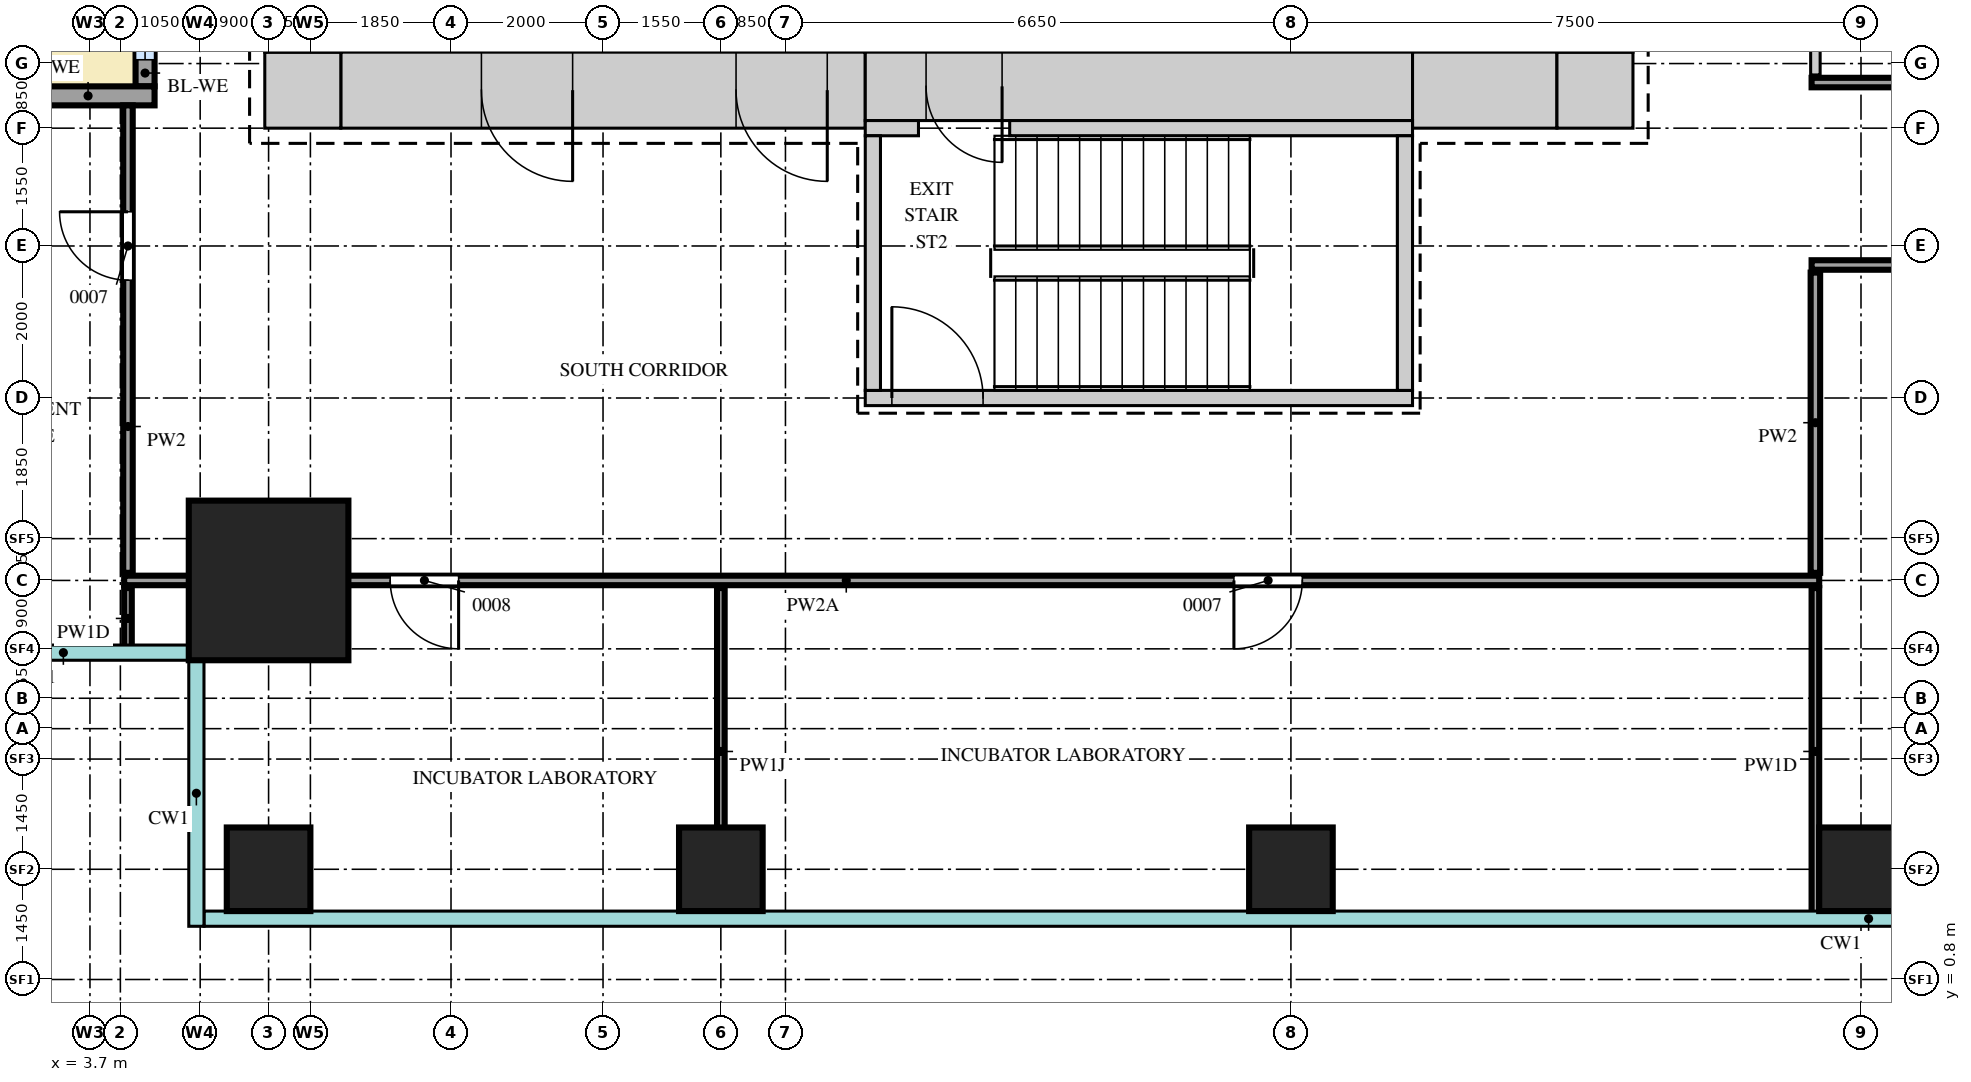
"""IFC4 building model, lengths in metres.
Left out: names, types, materials, properties, quantities, classifications, styles, units other than length and angle.
Written with IfcOpenShell. Run it as: python <this file> out.ifc"""

import sys

from ifc_helpers import new_model, si_unit, direction, frame, frame_2d, origin, origin_2d, place, context, subcontext, project, spatial, rectangle, extrude, source, transform, mapped, element, fill, save


model = new_model("IFC4")
c1 = context("Model", 3, precision=1e-05, world=origin(), true_north=direction((0.0, 1.0)))
c2 = subcontext(c1, "Body", "Model", "MODEL_VIEW")
j1 = project(units=[si_unit("LENGTHUNIT", "METRE"), si_unit("PLANEANGLEUNIT", "RADIAN")], contexts=[c1])
p1 = place(None, origin())
s1 = spatial("IfcSite", under=j1, at=p1, CompositionType="ELEMENT")
p2 = place(p1, origin())
s2 = spatial("IfcBuilding", under=s1, at=p2, CompositionType="ELEMENT")
p3 = place(p2, frame((0.0, 0.0, 149.9)))
s3 = spatial("IfcBuildingStorey", under=s2, at=p3, CompositionType="ELEMENT", Elevation=149.9)
m1 = source(origin(), c2, "Body", "SweptSolid", [
    extrude(rectangle(XDim=6.9, YDim=1.0, at=frame_2d((3.45, 0.0))), origin(), (0.0, 0.0, 1.0), 4.1),
])
p4 = place(p3, frame((7.0, 12.5, 0.0), z_axis=(0.0, 0.0, 1.0), x_axis=(1.0, 0.0, 0.0)))
e1 = element("IfcWall", 1, at=p4, inside=s3, PredefinedType="SHEAR", context=c2, shape_type="MappedRepresentation", body=[
    mapped(m1, transform((0.0, 0.0, 0.0))),
])
m2 = source(origin(), c2, "Body", "SweptSolid", [
    extrude(rectangle(XDim=1.2, YDim=2.1, at=frame_2d((0.6, 1.05))), frame((0.0, 0.51, 0.0), z_axis=(0.0, -1.0, 0.0), x_axis=(1.0, 0.0, 0.0)), (0.0, 0.0, 1.0), 1.02),
])
p5 = place(p4, frame((5.2, 0.0, 0.0)))
e2 = element("IfcOpeningElement", 2, at=p5, cuts=e1, PredefinedType="OPENING", context=c2, shape_type="MappedRepresentation", body=[
    mapped(m2, transform((0.0, 0.0, 0.0))),
])
p6 = place(p4, frame((1.85, 0.0, 0.0)))
e3 = element("IfcOpeningElement", 3, at=p6, cuts=e1, PredefinedType="OPENING", context=c2, shape_type="MappedRepresentation", body=[
    mapped(m2, transform((0.0, 0.0, 0.0))),
])
m3 = source(origin(), c2, "Body", "SweptSolid", [
    extrude(rectangle(XDim=7.2, YDim=0.9, at=frame_2d((3.6, 0.0))), origin(), (0.0, 0.0, 1.0), 4.1),
])
p7 = place(p3, frame((13.9, 12.55, 0.0), z_axis=(0.0, 0.0, 1.0), x_axis=(1.0, 0.0, 0.0)))
e4 = element("IfcWall", 4, at=p7, inside=s3, PredefinedType="SHEAR", context=c2, shape_type="MappedRepresentation", body=[
    mapped(m3, transform((0.0, 0.0, 0.0))),
])
m4 = source(origin(), c2, "Body", "SweptSolid", [
    extrude(rectangle(XDim=1.0, YDim=2.1, at=frame_2d((0.5, 1.05))), frame((0.0, 0.46, 0.0), z_axis=(0.0, -1.0, 0.0), x_axis=(1.0, 0.0, 0.0)), (0.0, 0.0, 1.0), 0.92),
])
p8 = place(p7, frame((0.8, 0.0, 0.0)))
e5 = element("IfcOpeningElement", 5, at=p8, cuts=e4, PredefinedType="OPENING", context=c2, shape_type="MappedRepresentation", body=[
    mapped(m4, transform((0.0, 0.0, 0.0))),
])
m5 = source(origin(), c2, "Body", "SweptSolid", [
    extrude(rectangle(XDim=1.9, YDim=1.0, at=frame_2d((0.95, 0.0))), origin(), (0.0, 0.0, 1.0), 4.1),
])
p9 = place(p3, frame((21.1, 12.5, 0.0), z_axis=(0.0, 0.0, 1.0), x_axis=(1.0, 0.0, 0.0)))
e6 = element("IfcWall", 6, at=p9, inside=s3, PredefinedType="SHEAR", context=c2, shape_type="MappedRepresentation", body=[
    mapped(m5, transform((0.0, 0.0, 0.0))),
])
m6 = source(origin(), c2, "Body", "SweptSolid", [
    extrude(rectangle(XDim=1.0, YDim=1.0, at=frame_2d((0.5, 0.0))), origin(), (0.0, 0.0, 1.0), 4.1),
])
for number, where, z_axis, x_axis in (
    (7, (23.0, 12.5, 0.0), (0.0, 0.0, 1.0), (1.0, 0.0, 0.0)),
    (8, (6.0, 12.5, 0.0), (0.0, 0.0, 1.0), (1.0, 0.0, 0.0)),
):
    element("IfcWall", number, at=place(p3, frame(where, z_axis=z_axis, x_axis=x_axis)), inside=s3, PredefinedType="SHEAR", context=c2, shape_type="MappedRepresentation", body=[
        mapped(m6, transform((0.0, 0.0, 0.0))),
    ])
m7 = source(origin(), c2, "Body", "SweptSolid", [
    extrude(rectangle(XDim=0.7, YDim=0.2, at=frame_2d((0.35, 0.0))), origin(), (0.0, 0.0, 1.0), 4.1),
])
p10 = place(p3, frame((13.9, 12.0, 0.0), z_axis=(0.0, 0.0, 1.0), x_axis=(1.0, 0.0, 0.0)))
e9 = element("IfcWall", 9, at=p10, inside=s3, PredefinedType="SHEAR", context=c2, shape_type="MappedRepresentation", body=[
    mapped(m7, transform((0.0, 0.0, 0.0))),
])
m8 = source(origin(), c2, "Body", "SweptSolid", [
    extrude(rectangle(XDim=5.3, YDim=0.2, at=frame_2d((2.65, 0.0))), origin(), (0.0, 0.0, 1.0), 4.1),
])
p11 = place(p3, frame((15.8, 12.0, 0.0), z_axis=(0.0, 0.0, 1.0), x_axis=(1.0, 0.0, 0.0)))
e10 = element("IfcWall", 10, at=p11, inside=s3, PredefinedType="SHEAR", context=c2, shape_type="MappedRepresentation", body=[
    mapped(m8, transform((0.0, 0.0, 0.0))),
])
m9 = source(origin(), c2, "Body", "SweptSolid", [
    extrude(rectangle(XDim=7.2, YDim=0.2, at=frame_2d((3.6, 0.0))), origin(), (0.0, 0.0, 1.0), 4.1),
])
p12 = place(p3, frame((13.9, 8.45, 0.0), z_axis=(0.0, 0.0, 1.0), x_axis=(1.0, 0.0, 0.0)))
e11 = element("IfcWall", 11, at=p12, inside=s3, PredefinedType="SHEAR", context=c2, shape_type="MappedRepresentation", body=[
    mapped(m9, transform((0.0, 0.0, 0.0))),
])
m10 = source(origin(), c2, "Body", "SweptSolid", [
    extrude(rectangle(XDim=1.2, YDim=2.1, at=frame_2d((0.6, 1.05))), frame((0.0, 0.11, 0.0), z_axis=(0.0, -1.0, 0.0), x_axis=(1.0, 0.0, 0.0)), (0.0, 0.0, 1.0), 0.22),
])
p13 = place(p12, frame((0.35, 0.0, 0.0)))
e12 = element("IfcOpeningElement", 12, at=p13, cuts=e11, PredefinedType="OPENING", context=c2, shape_type="MappedRepresentation", body=[
    mapped(m10, transform((0.0, 0.0, 0.0))),
])
m11 = source(origin(), c2, "Body", "SweptSolid", [
    extrude(rectangle(XDim=3.35, YDim=0.2, at=frame_2d((1.675, 0.0))), origin(), (0.0, 0.0, 1.0), 4.1),
])
for number, where, z_axis, x_axis in (
    (13, (21.0, 8.55, 0.0), (0.0, 0.0, 1.0), (0.0, 1.0, 0.0)),
    (14, (14.0, 8.55, 0.0), (0.0, 0.0, 1.0), (0.0, 1.0, 0.0)),
):
    element("IfcWall", number, at=place(p3, frame(where, z_axis=z_axis, x_axis=x_axis)), inside=s3, PredefinedType="SHEAR", context=c2, shape_type="MappedRepresentation", body=[
        mapped(m11, transform((0.0, 0.0, 0.0))),
    ])
m12 = source(origin(), c2, "Body", "SweptSolid", [
    extrude(rectangle(XDim=2.1, YDim=2.1, at=origin_2d()), origin(), (0.0, 0.0, 1.0), 4.4),
])
p14 = place(p3, frame((6.05, 6.05, 0.0), z_axis=(0.0, 0.0, 1.0), x_axis=(1.0, 0.0, 0.0)))
e15 = element("IfcColumn", 15, at=p14, inside=s3, PredefinedType="COLUMN", context=c2, shape_type="MappedRepresentation", body=[
    mapped(m12, transform((0.0, 0.0, 0.0))),
])
m13 = source(origin(), c2, "Body", "SweptSolid", [
    extrude(rectangle(XDim=1.1, YDim=1.1, at=origin_2d()), origin(), (0.0, 0.0, 1.0), 4.1),
])
for number, where, z_axis, x_axis in (
    (16, (6.05, 2.25, 0.0), (0.0, 0.0, 1.0), (1.0, 0.0, 0.0)),
    (17, (12.0, 2.25, 0.0), (0.0, 0.0, 1.0), (1.0, 0.0, 0.0)),
    (18, (19.5, 2.25, 0.0), (0.0, 0.0, 1.0), (1.0, 0.0, 0.0)),
    (19, (27.0, 2.25, 0.0), (0.0, 0.0, 1.0), (1.0, 0.0, 0.0)),
):
    element("IfcColumn", number, at=place(p3, frame(where, z_axis=z_axis, x_axis=x_axis)), inside=s3, PredefinedType="COLUMN", context=c2, shape_type="MappedRepresentation", body=[
        mapped(m13, transform((0.0, 0.0, 0.0))),
    ])
m14 = source(origin(), c2, "Body", "SweptSolid", [
    extrude(rectangle(XDim=6.4, YDim=0.25, at=frame_2d((3.2, 0.0))), origin(), (0.0, 0.0, 1.0), 3.5),
])
p15 = place(p3, frame((4.425, 12.55, 0.0), z_axis=(0.0, 0.0, 1.0), x_axis=(0.0, 1.0, 0.0)))
e20 = element("IfcWall", 20, at=p15, inside=s3, PredefinedType="SOLIDWALL", context=c2, shape_type="MappedRepresentation", body=[
    mapped(m14, transform((0.0, 0.0, 0.0))),
])
m15 = source(origin(), c2, "Body", "SweptSolid", [
    extrude(rectangle(XDim=1.65, YDim=2.4, at=frame_2d((0.825, 1.2))), frame((0.0, 0.135, 0.0), z_axis=(0.0, -1.0, 0.0), x_axis=(1.0, 0.0, 0.0)), (0.0, 0.0, 1.0), 0.27),
])
p16 = place(p15, frame((0.35, 0.0, 0.0)))
e21 = element("IfcOpeningElement", 21, at=p16, cuts=e20, PredefinedType="OPENING", context=c2, shape_type="MappedRepresentation", body=[
    mapped(m15, transform((0.0, 0.0, 0.0))),
])
p17 = place(p15, frame((4.4, 0.0, 0.0)))
e22 = element("IfcOpeningElement", 22, at=p17, cuts=e20, PredefinedType="OPENING", context=c2, shape_type="MappedRepresentation", body=[
    mapped(m15, transform((0.0, 0.0, 0.0))),
])
m16 = source(origin(), c2, "Body", "SweptSolid", [
    extrude(rectangle(XDim=1.8, YDim=2.4, at=frame_2d((0.9, 1.2))), frame((0.0, 0.135, 0.0), z_axis=(0.0, -1.0, 0.0), x_axis=(1.0, 0.0, 0.0)), (0.0, 0.0, 1.0), 0.27),
])
p18 = place(p15, frame((2.3, 0.0, 0.0)))
e23 = element("IfcOpeningElement", 23, at=p18, cuts=e20, PredefinedType="OPENING", context=c2, shape_type="MappedRepresentation", body=[
    mapped(m16, transform((0.0, 0.0, 0.0))),
])
m17 = source(origin(), c2, "Body", "SweptSolid", [
    extrude(rectangle(XDim=1.75, YDim=0.25, at=frame_2d((0.875, 0.0))), origin(), (0.0, 0.0, 1.0), 3.5),
])
p19 = place(p3, frame((2.8, 12.425, 0.0), z_axis=(0.0, 0.0, 1.0), x_axis=(1.0, 0.0, 0.0)))
e24 = element("IfcWall", 24, at=p19, inside=s3, PredefinedType="SOLIDWALL", context=c2, shape_type="MappedRepresentation", body=[
    mapped(m17, transform((0.0, 0.0, 0.0))),
])
m18 = source(origin(), c2, "Body", "SweptSolid", [
    extrude(rectangle(XDim=4.3, YDim=0.1, at=frame_2d((2.15, 0.0))), origin(), (0.0, 0.0, 1.0), 3.65),
])
p20 = place(p3, frame((12.0, 1.65, 0.0), z_axis=(0.0, 0.0, 1.0), x_axis=(0.0, 1.0, 0.0)))
e25 = element("IfcWall", 25, at=p20, inside=s3, PredefinedType="PARTITIONING", context=c2, shape_type="MappedRepresentation", body=[
    mapped(m18, transform((0.0, 0.0, 0.0))),
])
m19 = source(origin(), c2, "Body", "SweptSolid", [
    extrude(rectangle(XDim=4.3, YDim=0.1, at=frame_2d((2.15, 0.0))), origin(), (0.0, 0.0, 1.0), 4.2),
])
p21 = place(p3, frame((26.4, 1.65, 0.0), z_axis=(0.0, 0.0, 1.0), x_axis=(0.0, 1.0, 0.0)))
e26 = element("IfcWall", 26, at=p21, inside=s3, PredefinedType="PARTITIONING", context=c2, shape_type="MappedRepresentation", body=[
    mapped(m19, transform((0.0, 0.0, 0.0))),
])
m20 = source(origin(), c2, "Body", "SweptSolid", [
    extrude(rectangle(XDim=0.8, YDim=0.1, at=frame_2d((0.4, 0.0))), origin(), (0.0, 0.0, 1.0), 4.2),
])
p22 = place(p3, frame((4.2, 5.15, 0.0), z_axis=(0.0, 0.0, 1.0), x_axis=(0.0, 1.0, 0.0)))
e27 = element("IfcWall", 27, at=p22, inside=s3, PredefinedType="PARTITIONING", context=c2, shape_type="MappedRepresentation", body=[
    mapped(m20, transform((0.0, 0.0, 0.0))),
])
m21 = source(origin(), c2, "Body", "SweptSolid", [
    extrude(rectangle(XDim=22.3, YDim=0.125, at=frame_2d((11.15, 0.0))), origin(), (0.0, 0.0, 1.0), 3.55),
])
p23 = place(p3, frame((4.15, 6.05, 0.0), z_axis=(0.0, 0.0, 1.0), x_axis=(1.0, 0.0, 0.0)))
e28 = element("IfcWall", 28, at=p23, inside=s3, PredefinedType="PARTITIONING", context=c2, shape_type="MappedRepresentation", body=[
    mapped(m21, transform((0.0, 0.0, 0.0))),
])
m22 = source(origin(), c2, "Body", "SweptSolid", [
    extrude(rectangle(XDim=0.9, YDim=2.1, at=frame_2d((0.45, 1.05))), frame((0.0, 0.073, 0.0), z_axis=(0.0, -1.0, 0.0), x_axis=(1.0, 0.0, 0.0)), (0.0, 0.0, 1.0), 0.145),
])
p24 = place(p23, frame((3.5, 0.0, 0.0)))
e29 = element("IfcOpeningElement", 29, at=p24, cuts=e28, PredefinedType="OPENING", context=c2, shape_type="MappedRepresentation", body=[
    mapped(m22, transform((0.0, 0.0, 0.0))),
])
p25 = place(p23, frame((14.6, 0.0, 0.0)))
e30 = element("IfcOpeningElement", 30, at=p25, cuts=e28, PredefinedType="OPENING", context=c2, shape_type="MappedRepresentation", body=[
    mapped(m22, transform((0.0, 0.0, 0.0))),
])
m23 = source(origin(), c2, "Body", "SweptSolid", [
    extrude(rectangle(XDim=6.15, YDim=0.125, at=frame_2d((3.075, 0.0))), origin(), (0.0, 0.0, 1.0), 4.2),
])
p26 = place(p3, frame((4.2, 6.15, 0.0), z_axis=(0.0, 0.0, 1.0), x_axis=(0.0, 1.0, 0.0)))
e31 = element("IfcWall", 31, at=p26, inside=s3, PredefinedType="PARTITIONING", context=c2, shape_type="MappedRepresentation", body=[
    mapped(m23, transform((0.0, 0.0, 0.0))),
])
p27 = place(p26, frame((3.85, 0.0, 0.0)))
e32 = element("IfcOpeningElement", 32, at=p27, cuts=e31, PredefinedType="OPENING", context=c2, shape_type="MappedRepresentation", body=[
    mapped(m22, transform((0.0, 0.0, 0.0))),
])
m24 = source(origin(), c2, "Body", "SweptSolid", [
    extrude(rectangle(XDim=3.95, YDim=0.125, at=frame_2d((1.975, 0.0))), origin(), (0.0, 0.0, 1.0), 4.2),
])
p28 = place(p3, frame((26.4, 6.15, 0.0), z_axis=(0.0, 0.0, 1.0), x_axis=(0.0, 1.0, 0.0)))
e33 = element("IfcWall", 33, at=p28, inside=s3, PredefinedType="PARTITIONING", context=c2, shape_type="MappedRepresentation", body=[
    mapped(m24, transform((0.0, 0.0, 0.0))),
])
m25 = source(origin(), c2, "Body", "SweptSolid", [
    extrude(rectangle(XDim=20.0, YDim=0.125, at=frame_2d((10.0, 0.0))), origin(), (0.0, 0.0, 1.0), 4.2),
])
p29 = place(p3, frame((26.35, 10.2, 0.0), z_axis=(0.0, 0.0, 1.0), x_axis=(1.0, 0.0, 0.0)))
e34 = element("IfcWall", 34, at=p29, inside=s3, PredefinedType="PARTITIONING", context=c2, shape_type="MappedRepresentation", body=[
    mapped(m25, transform((0.0, 0.0, 0.0))),
])
m26 = source(origin(), c2, "Body", "SweptSolid", [
    extrude(rectangle(XDim=1.2, YDim=2.1, at=frame_2d((0.6, 1.05))), frame((0.0, 0.073, 0.0), z_axis=(0.0, -1.0, 0.0), x_axis=(1.0, 0.0, 0.0)), (0.0, 0.0, 1.0), 0.145),
])
p30 = place(p29, frame((8.25, 0.0, 0.0)))
e35 = element("IfcOpeningElement", 35, at=p30, cuts=e34, PredefinedType="OPENING", context=c2, shape_type="MappedRepresentation", body=[
    mapped(m26, transform((0.0, 0.0, 0.0))),
])
m27 = source(origin(), c2, "Body", "SweptSolid", [
    extrude(rectangle(XDim=17.7, YDim=0.125, at=frame_2d((8.85, 0.0))), origin(), (0.0, 0.0, 1.0), 4.2),
])
p31 = place(p3, frame((26.35, 12.6, 0.0), z_axis=(0.0, 0.0, 1.0), x_axis=(1.0, 0.0, 0.0)))
e36 = element("IfcWall", 36, at=p31, inside=s3, PredefinedType="PARTITIONING", context=c2, shape_type="MappedRepresentation", body=[
    mapped(m27, transform((0.0, 0.0, 0.0))),
])
m28 = source(origin(), c2, "Body", "SweptSolid", [
    extrude(rectangle(XDim=23.2, YDim=0.125, at=frame_2d((11.6, 0.0))), origin(), (0.0, 0.0, 1.0), 4.2),
])
p32 = place(p3, frame((26.4, 12.7, 0.0), z_axis=(0.0, 0.0, 1.0), x_axis=(0.0, 1.0, 0.0)))
e37 = element("IfcWall", 37, at=p32, inside=s3, PredefinedType="PARTITIONING", context=c2, shape_type="MappedRepresentation", body=[
    mapped(m28, transform((0.0, 0.0, 0.0))),
])
p33 = place(p32, frame((6.65, 0.0, 0.0)))
e38 = element("IfcOpeningElement", 38, at=p33, cuts=e37, PredefinedType="OPENING", context=c2, shape_type="MappedRepresentation", body=[
    mapped(m26, transform((0.0, 0.0, 0.0))),
])
m29 = source(origin(), c2, "Body", "SweptSolid", [
    extrude(rectangle(XDim=1.65, YDim=2.4, at=frame_2d((0.825, 1.2))), frame((0.0, 0.03, 0.0), z_axis=(0.0, -1.0, 0.0), x_axis=(1.0, 0.0, 0.0)), (0.0, 0.0, 1.0), 0.06),
])
p34 = place(p16, origin())
e39 = element("IfcWindow", 39, at=p34, inside=s3, PartitioningType="SINGLE_PANEL", PredefinedType="WINDOW", context=c2, shape_type="MappedRepresentation", body=[
    mapped(m29, transform((0.0, 0.0, 0.0))),
])
fill(e21, e39)
m30 = source(origin(), c2, "Body", "SweptSolid", [
    extrude(rectangle(XDim=1.2, YDim=2.1, at=frame_2d((0.6, 1.05))), frame((0.0, 0.45, 0.0), z_axis=(0.0, -1.0, 0.0), x_axis=(1.0, 0.0, 0.0)), (0.0, 0.0, 1.0), 0.9),
])
p35 = place(p5, origin())
e40 = element("IfcDoor", 40, at=p35, inside=s3, OperationType="SINGLE_SWING_RIGHT", PredefinedType="DOOR", context=c2, shape_type="MappedRepresentation", body=[
    mapped(m30, transform((0.0, 0.0, 0.0))),
])
fill(e2, e40)
p36 = place(p6, origin())
e41 = element("IfcDoor", 41, at=p36, inside=s3, OperationType="SINGLE_SWING_RIGHT", PredefinedType="DOOR", context=c2, shape_type="MappedRepresentation", body=[
    mapped(m30, transform((0.0, 0.0, 0.0))),
])
fill(e3, e41)
m31 = source(origin(), c2, "Body", "SweptSolid", [
    extrude(rectangle(XDim=1.0, YDim=2.1, at=frame_2d((0.5, 1.05))), frame((0.0, 0.4, 0.0), z_axis=(0.0, -1.0, 0.0), x_axis=(1.0, 0.0, 0.0)), (0.0, 0.0, 1.0), 0.8),
])
p37 = place(p8, origin())
e42 = element("IfcDoor", 42, at=p37, inside=s3, OperationType="SINGLE_SWING_RIGHT", PredefinedType="DOOR", context=c2, shape_type="MappedRepresentation", body=[
    mapped(m31, transform((0.0, 0.0, 0.0))),
])
fill(e5, e42)
m32 = source(origin(), c2, "Body", "SweptSolid", [
    extrude(rectangle(XDim=0.9, YDim=2.1, at=frame_2d((0.45, 1.05))), frame((0.0, 0.025, 0.0), z_axis=(0.0, -1.0, 0.0), x_axis=(1.0, 0.0, 0.0)), (0.0, 0.0, 1.0), 0.05),
])
p38 = place(p24, origin())
e43 = element("IfcDoor", 43, at=p38, inside=s3, OperationType="SINGLE_SWING_RIGHT", PredefinedType="DOOR", context=c2, shape_type="MappedRepresentation", body=[
    mapped(m32, transform((0.0, 0.0, 0.0))),
])
fill(e29, e43)
p39 = place(p25, origin())
e44 = element("IfcDoor", 44, at=p39, inside=s3, OperationType="SINGLE_SWING_LEFT", PredefinedType="DOOR", context=c2, shape_type="MappedRepresentation", body=[
    mapped(m32, transform((0.0, 0.0, 0.0))),
])
fill(e30, e44)
p40 = place(p27, origin())
e45 = element("IfcDoor", 45, at=p40, inside=s3, OperationType="SINGLE_SWING_LEFT", PredefinedType="DOOR", context=c2, shape_type="MappedRepresentation", body=[
    mapped(m32, transform((0.0, 0.0, 0.0))),
])
fill(e32, e45)
m33 = source(origin(), c2, "Body", "SweptSolid", [
    extrude(rectangle(XDim=1.2, YDim=2.1, at=frame_2d((0.6, 1.05))), frame((0.0, 0.025, 0.0), z_axis=(0.0, -1.0, 0.0), x_axis=(1.0, 0.0, 0.0)), (0.0, 0.0, 1.0), 0.05),
])
p41 = place(p13, origin())
e46 = element("IfcDoor", 46, at=p41, inside=s3, OperationType="SINGLE_SWING_RIGHT", PredefinedType="DOOR", context=c2, shape_type="MappedRepresentation", body=[
    mapped(m33, transform((0.0, 0.0, 0.0))),
])
fill(e12, e46)
save(model, sys.argv[1])
